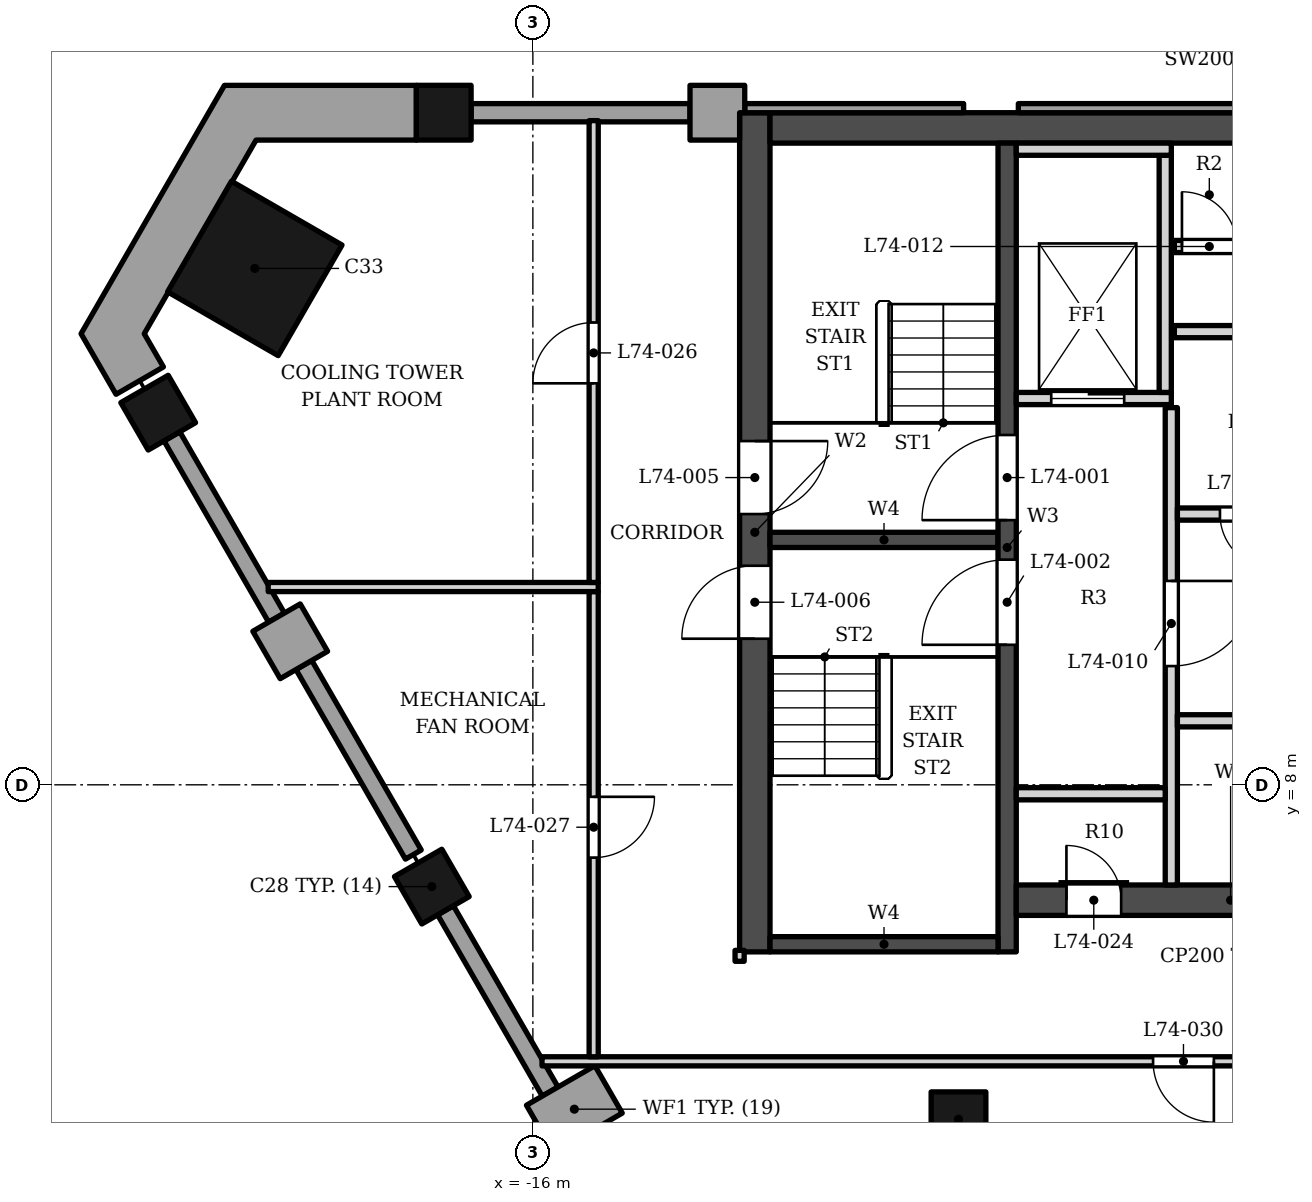
"""IFC4 building model, lengths in metres.
Left out: names, types, materials, properties, quantities, classifications, styles, units other than length and angle.
Written with IfcOpenShell. Run it as: python <this file> out.ifc"""

import sys

from ifc_helpers import new_model, si_unit, direction, frame, frame_2d, origin, origin_2d, place, context, subcontext, project, spatial, polyline, rectangle, outline, extrude, element, fill, save


model = new_model("IFC4")
c1 = context("Model", 3, precision=1e-05, world=origin(), true_north=direction((0.0, 1.0)))
c2 = subcontext(c1, "Body", "Model", "MODEL_VIEW")
j1 = project(units=[si_unit("LENGTHUNIT", "METRE"), si_unit("PLANEANGLEUNIT", "RADIAN")], contexts=[c1])
p1 = place(None, origin())
s1 = spatial("IfcSite", under=j1, at=p1, CompositionType="ELEMENT")
p2 = place(p1, origin())
s2 = spatial("IfcBuilding", under=s1, at=p2, CompositionType="ELEMENT")
p3 = place(p2, frame((0.0, 0.0, 315.5)))
s3 = spatial("IfcBuildingStorey", under=s2, at=p3, CompositionType="ELEMENT", Elevation=315.5)
p4 = place(p3, frame((-12.1, 18.802, 0.0), z_axis=(0.0, 0.0, 1.0), x_axis=(1.0, 0.0, 0.0)))
e1 = element("IfcWall", 1, at=p4, inside=s3, PredefinedType="SHEAR", context=c2, shape_type="SweptSolid", body=[
    extrude(rectangle(XDim=24.2, YDim=0.5, at=frame_2d((12.1, 0.0))), origin(), (0.0, 0.0, 1.0), 5.0),
])
p5 = place(p3, frame((-12.35, 5.253, 0.0), z_axis=(0.0, 0.0, 1.0), x_axis=(0.0, 1.0, 0.0)))
e2 = element("IfcWall", 2, at=p5, inside=s3, PredefinedType="SHEAR", context=c2, shape_type="SweptSolid", body=[
    extrude(rectangle(XDim=13.8, YDim=0.5, at=frame_2d((6.9, 0.0))), origin(), (0.0, 0.0, 1.0), 5.0),
])
p6 = place(p5, frame((7.2, 0.0, 0.0)))
e3 = element("IfcOpeningElement", 3, at=p6, cuts=e2, PredefinedType="OPENING", context=c2, shape_type="SweptSolid", body=[
    extrude(rectangle(XDim=1.2, YDim=2.1, at=frame_2d((0.6, 1.05))), frame((0.0, 0.26, 0.0), z_axis=(0.0, -1.0, 0.0), x_axis=(1.0, 0.0, 0.0)), (0.0, 0.0, 1.0), 0.52),
])
p7 = place(p5, frame((5.15, 0.0, 0.0)))
e4 = element("IfcOpeningElement", 4, at=p7, cuts=e2, PredefinedType="OPENING", context=c2, shape_type="SweptSolid", body=[
    extrude(rectangle(XDim=1.2, YDim=2.1, at=frame_2d((0.6, 1.05))), frame((0.0, 0.26, 0.0), z_axis=(0.0, -1.0, 0.0), x_axis=(1.0, 0.0, 0.0)), (0.0, 0.0, 1.0), 0.52),
])
p8 = place(p3, frame((-8.2, 5.253, 0.0), z_axis=(0.0, 0.0, 1.0), x_axis=(0.0, 1.0, 0.0)))
e5 = element("IfcWall", 5, at=p8, inside=s3, PredefinedType="SHEAR", context=c2, shape_type="SweptSolid", body=[
    extrude(rectangle(XDim=13.3, YDim=0.3, at=frame_2d((6.65, 0.0))), origin(), (0.0, 0.0, 1.0), 5.0),
])
p9 = place(p8, frame((7.1, 0.0, 0.0)))
e6 = element("IfcOpeningElement", 6, at=p9, cuts=e5, PredefinedType="OPENING", context=c2, shape_type="SweptSolid", body=[
    extrude(rectangle(XDim=1.4, YDim=2.1, at=frame_2d((0.7, 1.05))), frame((0.0, 0.16, 0.0), z_axis=(0.0, -1.0, 0.0), x_axis=(1.0, 0.0, 0.0)), (0.0, 0.0, 1.0), 0.32),
])
p10 = place(p8, frame((5.05, 0.0, 0.0)))
e7 = element("IfcOpeningElement", 7, at=p10, cuts=e5, PredefinedType="OPENING", context=c2, shape_type="SweptSolid", body=[
    extrude(rectangle(XDim=1.4, YDim=2.1, at=frame_2d((0.7, 1.05))), frame((0.0, 0.16, 0.0), z_axis=(0.0, -1.0, 0.0), x_axis=(1.0, 0.0, 0.0)), (0.0, 0.0, 1.0), 0.32),
])
for number, where, z_axis, x_axis in (
    (8, (-12.1, 12.028, 0.0), (0.0, 0.0, 1.0), (1.0, 0.0, 0.0)),
    (9, (-12.1, 5.378, 0.0), (0.0, 0.0, 1.0), (1.0, 0.0, 0.0)),
):
    element("IfcWall", number, at=place(p3, frame(where, z_axis=z_axis, x_axis=x_axis)), inside=s3, PredefinedType="SHEAR", context=c2, shape_type="SweptSolid", body=[
        extrude(rectangle(XDim=3.75, YDim=0.25, at=frame_2d((1.875, 0.0))), origin(), (0.0, 0.0, 1.0), 5.0),
    ])
p11 = place(p3, frame((-8.05, 6.103, 0.0), z_axis=(0.0, 0.0, 1.0), x_axis=(1.0, 0.0, 0.0)))
e10 = element("IfcWall", 10, at=p11, inside=s3, PredefinedType="SHEAR", context=c2, shape_type="SweptSolid", body=[
    extrude(rectangle(XDim=7.05, YDim=0.5, at=frame_2d((3.525, 0.0))), origin(), (0.0, 0.0, 1.0), 5.0),
])
p12 = place(p11, frame((0.825, 0.0, 0.0)))
e11 = element("IfcOpeningElement", 11, at=p12, cuts=e10, PredefinedType="OPENING", context=c2, shape_type="SweptSolid", body=[
    extrude(rectangle(XDim=0.9, YDim=2.1, at=frame_2d((0.45, 1.05))), frame((0.0, 0.26, 0.0), z_axis=(0.0, -1.0, 0.0), x_axis=(1.0, 0.0, 0.0)), (0.0, 0.0, 1.0), 0.52),
])
p13 = place(p3, frame((-20.573, 16.492, 0.0), z_axis=(0.0, 0.0, 1.0), x_axis=(0.866025395058, -0.500000015115, 0.0)))
e12 = element("IfcColumn", 12, at=p13, inside=s3, PredefinedType="COLUMN", context=c2, shape_type="SweptSolid", body=[
    extrude(rectangle(XDim=2.1, YDim=2.1, at=origin_2d()), origin(), (0.0, 0.0, 1.0), 5.0),
])
for number, where, z_axis, x_axis in (
    (13, (-9.0, 2.5, 0.0), (0.0, 0.0, 1.0), (1.0, 0.0, 0.0)),
    (14, (-22.162, 14.12, 0.0), (0.0, 0.0, 1.0), (0.5, -0.866, 0.0)),
    (15, (-17.662, 6.326, 0.0), (0.0, 0.0, 1.0), (0.5, -0.866, 0.0)),
    (16, (-17.466, 19.053, 0.0), (0.0, 0.0, 1.0), (-1.0, 0.0, 0.0)),
):
    element("IfcColumn", number, at=place(p3, frame(where, z_axis=z_axis, x_axis=x_axis)), inside=s3, PredefinedType="COLUMN", context=c2, shape_type="SweptSolid", body=[
        extrude(rectangle(XDim=0.9, YDim=0.9, at=origin_2d()), origin(), (0.0, 0.0, 1.0), 5.0),
    ])
p14 = place(p3, frame((-20.216, 10.75, 0.0), z_axis=(0.0, 0.0, 1.0), x_axis=(0.500105887137, -0.865964261186, 0.0)))
e17 = element("IfcWall", 17, at=p14, inside=s3, PredefinedType="SOLIDWALL", context=c2, shape_type="SweptSolid", body=[
    extrude(rectangle(XDim=0.9, YDim=0.9, at=frame_2d((0.45, 0.0))), origin(), (0.0, 0.0, 1.0), 3.8),
])
p15 = place(p3, frame((-15.881, 2.341, 0.0), z_axis=(0.0, 0.0, 1.0), x_axis=(0.86611990832, 0.499836277606, 0.0)))
e18 = element("IfcWall", 18, at=p15, inside=s3, PredefinedType="SOLIDWALL", context=c2, shape_type="SweptSolid", body=[
    extrude(rectangle(XDim=1.3, YDim=0.9, at=frame_2d((0.65, 0.0))), origin(), (0.0, 0.0, 1.0), 3.8),
])
p16 = place(p3, origin())
e19 = element("IfcWall", 19, at=p16, inside=s3, PredefinedType="ELEMENTEDWALL", context=c2, shape_type="SweptSolid", body=[
    extrude(outline(polyline([(-20.086, 10.825), (-21.807, 13.805), (-22.067, 13.655), (-20.346, 10.675), (-20.086, 10.825)])), origin(), (0.0, 0.0, 1.0), 3.8),
])
p17 = place(p3, frame((-19.766, 9.97, 0.0), z_axis=(0.0, 0.0, 1.0), x_axis=(0.499961193289, -0.866047807691, 0.0)))
e20 = element("IfcWall", 20, at=p17, inside=s3, PredefinedType="ELEMENTEDWALL", context=c2, shape_type="SweptSolid", body=[
    extrude(rectangle(XDim=3.6, YDim=0.3, at=frame_2d((1.8, 0.0))), origin(), (0.0, 0.0, 1.0), 3.8),
])
p18 = place(p3, origin())
e21 = element("IfcWall", 21, at=p18, inside=s3, PredefinedType="ELEMENTEDWALL", context=c2, shape_type="SweptSolid", body=[
    extrude(outline(polyline([(-15.586, 3.031), (-17.307, 6.011), (-17.567, 5.861), (-15.846, 2.88), (-15.586, 3.031)])), origin(), (0.0, 0.0, 1.0), 3.8),
])
p19 = place(p3, origin())
e22 = element("IfcWall", 22, at=p19, inside=s3, PredefinedType="SOLIDWALL", context=c2, shape_type="SweptSolid", body=[
    extrude(outline(polyline([(-13.416, 19.502), (-13.416, 18.603), (-12.6, 18.603), (-12.6, 19.052), (-12.516, 19.052), (-12.516, 19.502), (-13.416, 19.502)])), origin(), (0.0, 0.0, 1.0), 3.8),
])
p20 = place(p3, origin())
e23 = element("IfcWall", 23, at=p20, inside=s3, PredefinedType="ELEMENTEDWALL", context=c2, shape_type="SweptSolid", body=[
    extrude(outline(polyline([(-4.416, 19.203), (-8.016, 19.203), (-8.016, 19.052), (-4.416, 19.052), (-4.416, 19.203)])), origin(), (0.0, 0.0, 1.0), 3.8),
])
p21 = place(p3, origin())
e24 = element("IfcWall", 24, at=p21, inside=s3, PredefinedType="ELEMENTEDWALL", context=c2, shape_type="SweptSolid", body=[
    extrude(outline(polyline([(-8.916, 19.203), (-12.516, 19.203), (-12.516, 19.052), (-8.916, 19.052), (-8.916, 19.203)])), origin(), (0.0, 0.0, 1.0), 3.8),
])
p22 = place(p3, frame((-13.416, 19.052, 0.0), z_axis=(0.0, 0.0, 1.0), x_axis=(-1.0, 0.0, 0.0)))
e25 = element("IfcWall", 25, at=p22, inside=s3, PredefinedType="ELEMENTEDWALL", context=c2, shape_type="SweptSolid", body=[
    extrude(rectangle(XDim=3.6, YDim=0.3, at=frame_2d((1.8, 0.0))), origin(), (0.0, 0.0, 1.0), 3.8),
])
p23 = place(p3, origin())
e26 = element("IfcWall", 26, at=p23, inside=s3, PredefinedType="SOLIDWALL", context=c2, shape_type="SweptSolid", body=[
    extrude(outline(polyline([(-17.916, 18.603), (-17.916, 19.502), (-21.073, 19.502), (-23.431, 15.418), (-22.856, 14.422), (-22.076, 14.872), (-22.392, 15.418), (-20.553, 18.603), (-17.916, 18.603)])), origin(), (0.0, 0.0, 1.0), 3.8),
])
p24 = place(p3, frame((-5.5, 6.353, 0.0), z_axis=(0.0, 0.0, 1.0), x_axis=(0.0, 1.0, 0.0)))
e27 = element("IfcWall", 27, at=p24, inside=s3, PredefinedType="SOLIDWALL", context=c2, shape_type="SweptSolid", body=[
    extrude(rectangle(XDim=7.85, YDim=0.2, at=frame_2d((3.925, 0.0))), origin(), (0.0, 0.0, 1.0), 4.8),
])
p25 = place(p24, frame((3.6, 0.0, 0.0)))
e28 = element("IfcOpeningElement", 28, at=p25, cuts=e27, PredefinedType="OPENING", context=c2, shape_type="SweptSolid", body=[
    extrude(rectangle(XDim=1.4, YDim=2.1, at=frame_2d((0.7, 1.05))), frame((0.0, 0.11, 0.0), z_axis=(0.0, -1.0, 0.0), x_axis=(1.0, 0.0, 0.0)), (0.0, 0.0, 1.0), 0.22),
])
p26 = place(p3, frame((-8.05, 7.853, 0.0), z_axis=(0.0, 0.0, 1.0), x_axis=(1.0, 0.0, 0.0)))
e29 = element("IfcWall", 29, at=p26, inside=s3, PredefinedType="SOLIDWALL", context=c2, shape_type="SweptSolid", body=[
    extrude(rectangle(XDim=2.45, YDim=0.2, at=frame_2d((1.225, 0.0))), origin(), (0.0, 0.0, 1.0), 4.8),
])
p27 = place(p3, frame((-5.4, 9.052, 0.0), z_axis=(0.0, 0.0, 1.0), x_axis=(1.0, 0.0, 0.0)))
e30 = element("IfcWall", 30, at=p27, inside=s3, PredefinedType="PARTITIONING", context=c2, shape_type="SweptSolid", body=[
    extrude(rectangle(XDim=4.3, YDim=0.2, at=frame_2d((2.15, 0.0))), origin(), (0.0, 0.0, 1.0), 4.8),
])
p28 = place(p27, frame((1.7, 0.0, 0.0)))
e31 = element("IfcOpeningElement", 31, at=p28, cuts=e30, PredefinedType="OPENING", context=c2, shape_type="SweptSolid", body=[
    extrude(rectangle(XDim=0.9, YDim=2.1, at=frame_2d((0.45, 1.05))), frame((0.0, 0.11, 0.0), z_axis=(0.0, -1.0, 0.0), x_axis=(1.0, 0.0, 0.0)), (0.0, 0.0, 1.0), 0.22),
])
p29 = place(p3, frame((-5.4, 12.453, 0.0), z_axis=(0.0, 0.0, 1.0), x_axis=(1.0, 0.0, 0.0)))
e32 = element("IfcWall", 32, at=p29, inside=s3, PredefinedType="PARTITIONING", context=c2, shape_type="SweptSolid", body=[
    extrude(rectangle(XDim=2.3, YDim=0.2, at=frame_2d((1.15, 0.0))), origin(), (0.0, 0.0, 1.0), 4.8),
])
p30 = place(p29, frame((0.7, 0.0, 0.0)))
e33 = element("IfcOpeningElement", 33, at=p30, cuts=e32, PredefinedType="OPENING", context=c2, shape_type="SweptSolid", body=[
    extrude(rectangle(XDim=0.9, YDim=2.1, at=frame_2d((0.45, 1.05))), frame((0.0, 0.11, 0.0), z_axis=(0.0, -1.0, 0.0), x_axis=(1.0, 0.0, 0.0)), (0.0, 0.0, 1.0), 0.22),
])
p31 = place(p3, frame((-8.05, 14.353, 0.0), z_axis=(0.0, 0.0, 1.0), x_axis=(1.0, 0.0, 0.0)))
e34 = element("IfcWall", 34, at=p31, inside=s3, PredefinedType="SOLIDWALL", context=c2, shape_type="SweptSolid", body=[
    extrude(rectangle(XDim=2.55, YDim=0.2, at=frame_2d((1.275, 0.0))), origin(), (0.0, 0.0, 1.0), 4.8),
])
p32 = place(p31, frame((0.575, 0.0, 0.0)))
e35 = element("IfcOpeningElement", 35, at=p32, cuts=e34, PredefinedType="OPENING", context=c2, shape_type="SweptSolid", body=[
    extrude(rectangle(XDim=1.2, YDim=2.1, at=frame_2d((0.6, 1.05))), frame((0.0, 0.11, 0.0), z_axis=(0.0, -1.0, 0.0), x_axis=(1.0, 0.0, 0.0)), (0.0, 0.0, 1.0), 0.22),
])
p33 = place(p3, frame((-5.6, 14.453, 0.0), z_axis=(0.0, 0.0, 1.0), x_axis=(0.0, 1.0, 0.0)))
e36 = element("IfcWall", 36, at=p33, inside=s3, PredefinedType="SOLIDWALL", context=c2, shape_type="SweptSolid", body=[
    extrude(rectangle(XDim=3.9, YDim=0.2, at=frame_2d((1.95, 0.0))), origin(), (0.0, 0.0, 1.0), 4.8),
])
p34 = place(p3, frame((-5.45, 15.453, 0.0), z_axis=(0.0, 0.0, 1.0), x_axis=(1.0, 0.0, 0.0)))
e37 = element("IfcWall", 37, at=p34, inside=s3, PredefinedType="SOLIDWALL", context=c2, shape_type="SweptSolid", body=[
    extrude(rectangle(XDim=2.35, YDim=0.2, at=frame_2d((1.175, 0.0))), origin(), (0.0, 0.0, 1.0), 4.8),
])
p35 = place(p3, frame((-5.45, 16.853, 0.0), z_axis=(0.0, 0.0, 1.0), x_axis=(1.0, 0.0, 0.0)))
e38 = element("IfcWall", 38, at=p35, inside=s3, PredefinedType="SOLIDWALL", context=c2, shape_type="SweptSolid", body=[
    extrude(rectangle(XDim=2.55, YDim=0.2, at=frame_2d((1.275, 0.0))), origin(), (0.0, 0.0, 1.0), 4.8),
])
p36 = place(p35, frame((0.125, 0.0, 0.0)))
e39 = element("IfcOpeningElement", 39, at=p36, cuts=e38, PredefinedType="OPENING", context=c2, shape_type="SweptSolid", body=[
    extrude(rectangle(XDim=0.9, YDim=2.1, at=frame_2d((0.45, 1.05))), frame((0.0, 0.11, 0.0), z_axis=(0.0, -1.0, 0.0), x_axis=(1.0, 0.0, 0.0)), (0.0, 0.0, 1.0), 0.22),
])
p37 = place(p35, frame((1.375, 0.0, 0.0)))
e40 = element("IfcOpeningElement", 40, at=p37, cuts=e38, PredefinedType="OPENING", context=c2, shape_type="SweptSolid", body=[
    extrude(rectangle(XDim=0.9, YDim=2.1, at=frame_2d((0.45, 1.05))), frame((0.0, 0.11, 0.0), z_axis=(0.0, -1.0, 0.0), x_axis=(1.0, 0.0, 0.0)), (0.0, 0.0, 1.0), 0.22),
])
p38 = place(p3, frame((-8.05, 18.453, 0.0), z_axis=(0.0, 0.0, 1.0), x_axis=(1.0, 0.0, 0.0)))
e41 = element("IfcWall", 41, at=p38, inside=s3, PredefinedType="SOLIDWALL", context=c2, shape_type="SweptSolid", body=[
    extrude(rectangle(XDim=2.55, YDim=0.2, at=frame_2d((1.275, 0.0))), origin(), (0.0, 0.0, 1.0), 4.8),
])
p39 = place(p3, frame((-15.85, 3.453, 0.0), z_axis=(0.0, 0.0, 1.0), x_axis=(1.0, 0.0, 0.0)))
e42 = element("IfcWall", 42, at=p39, inside=s3, PredefinedType="PARTITIONING", context=c2, shape_type="SweptSolid", body=[
    extrude(rectangle(XDim=17.755, YDim=0.15, at=frame_2d((8.877, 0.0))), origin(), (0.0, 0.0, 1.0), 4.1),
])
p40 = place(p39, frame((10.05, 0.0, 0.0)))
e43 = element("IfcOpeningElement", 43, at=p40, cuts=e42, PredefinedType="OPENING", context=c2, shape_type="SweptSolid", body=[
    extrude(rectangle(XDim=1.0, YDim=2.1, at=frame_2d((0.5, 1.05))), frame((0.0, 0.085, 0.0), z_axis=(0.0, -1.0, 0.0), x_axis=(1.0, 0.0, 0.0)), (0.0, 0.0, 1.0), 0.17),
])
p41 = place(p3, frame((-15.0, 3.528, 0.0), z_axis=(0.0, 0.0, 1.0), x_axis=(0.0, 1.0, 0.0)))
e44 = element("IfcWall", 44, at=p41, inside=s3, PredefinedType="PARTITIONING", context=c2, shape_type="SweptSolid", body=[
    extrude(rectangle(XDim=7.65, YDim=0.15, at=frame_2d((3.825, 0.0))), origin(), (0.0, 0.0, 1.0), 4.02),
])
p42 = place(p41, frame((3.275, 0.0, 0.0)))
e45 = element("IfcOpeningElement", 45, at=p42, cuts=e44, PredefinedType="OPENING", context=c2, shape_type="SweptSolid", body=[
    extrude(rectangle(XDim=1.0, YDim=2.1, at=frame_2d((0.5, 1.05))), frame((0.0, 0.085, 0.0), z_axis=(0.0, -1.0, 0.0), x_axis=(1.0, 0.0, 0.0)), (0.0, 0.0, 1.0), 0.17),
])
p43 = place(p3, frame((-12.6, 5.098, 0.0), z_axis=(0.0, 0.0, 1.0), x_axis=(0.0, 1.0, 0.0)))
e46 = element("IfcWall", 46, at=p43, inside=s3, PredefinedType="PARTITIONING", context=c2, shape_type="SweptSolid", body=[
    extrude(rectangle(XDim=0.18, YDim=0.15, at=frame_2d((0.09, 0.0))), origin(), (0.0, 0.0, 1.0), 4.8),
])
p44 = place(p3, frame((-20.353, 11.253, 0.0), z_axis=(0.0, 0.0, 1.0), x_axis=(1.0, 0.0, 0.0)))
e47 = element("IfcWall", 47, at=p44, inside=s3, PredefinedType="PARTITIONING", context=c2, shape_type="SweptSolid", body=[
    extrude(rectangle(XDim=5.428, YDim=0.15, at=frame_2d((2.714, 0.0))), origin(), (0.0, 0.0, 1.0), 4.1),
])
p45 = place(p3, frame((-15.0, 11.328, 0.0), z_axis=(0.0, 0.0, 1.0), x_axis=(0.0, 1.0, 0.0)))
e48 = element("IfcWall", 48, at=p45, inside=s3, PredefinedType="PARTITIONING", context=c2, shape_type="SweptSolid", body=[
    extrude(rectangle(XDim=7.595, YDim=0.15, at=frame_2d((3.797, 0.0))), origin(), (0.0, 0.0, 1.0), 4.8),
])
p46 = place(p45, frame((3.275, 0.0, 0.0)))
e49 = element("IfcOpeningElement", 49, at=p46, cuts=e48, PredefinedType="OPENING", context=c2, shape_type="SweptSolid", body=[
    extrude(rectangle(XDim=1.0, YDim=2.1, at=frame_2d((0.5, 1.05))), frame((0.0, 0.085, 0.0), z_axis=(0.0, -1.0, 0.0), x_axis=(1.0, 0.0, 0.0)), (0.0, 0.0, 1.0), 0.17),
])
p47 = place(p32, origin())
e50 = element("IfcDoor", 50, at=p47, inside=s3, OperationType="DOUBLE_DOOR_SLIDING", PredefinedType="DOOR", context=c2, shape_type="SweptSolid", body=[
    extrude(rectangle(XDim=1.2, YDim=2.1, at=frame_2d((0.6, 1.05))), frame((0.0, 0.025, 0.0), z_axis=(0.0, -1.0, 0.0), x_axis=(1.0, 0.0, 0.0)), (0.0, 0.0, 1.0), 0.05),
])
fill(e35, e50)
p48 = place(p9, origin())
e51 = element("IfcDoor", 51, at=p48, inside=s3, OperationType="SINGLE_SWING_LEFT", PredefinedType="DOOR", context=c2, shape_type="SweptSolid", body=[
    extrude(rectangle(XDim=1.4, YDim=2.1, at=frame_2d((0.7, 1.05))), frame((0.0, 0.025, 0.0), z_axis=(0.0, -1.0, 0.0), x_axis=(1.0, 0.0, 0.0)), (0.0, 0.0, 1.0), 0.05),
])
fill(e6, e51)
p49 = place(p10, origin())
e52 = element("IfcDoor", 52, at=p49, inside=s3, OperationType="SINGLE_SWING_LEFT", PredefinedType="DOOR", context=c2, shape_type="SweptSolid", body=[
    extrude(rectangle(XDim=1.4, YDim=2.1, at=frame_2d((0.7, 1.05))), frame((0.0, 0.025, 0.0), z_axis=(0.0, -1.0, 0.0), x_axis=(1.0, 0.0, 0.0)), (0.0, 0.0, 1.0), 0.05),
])
fill(e7, e52)
p50 = place(p6, origin())
e53 = element("IfcDoor", 53, at=p50, inside=s3, OperationType="SINGLE_SWING_RIGHT", PredefinedType="DOOR", context=c2, shape_type="SweptSolid", body=[
    extrude(rectangle(XDim=1.2, YDim=2.1, at=frame_2d((0.6, 1.05))), frame((0.0, 0.025, 0.0), z_axis=(0.0, -1.0, 0.0), x_axis=(1.0, 0.0, 0.0)), (0.0, 0.0, 1.0), 0.05),
])
fill(e3, e53)
p51 = place(p7, origin())
e54 = element("IfcDoor", 54, at=p51, inside=s3, OperationType="SINGLE_SWING_LEFT", PredefinedType="DOOR", context=c2, shape_type="SweptSolid", body=[
    extrude(rectangle(XDim=1.2, YDim=2.1, at=frame_2d((0.6, 1.05))), frame((0.0, 0.025, 0.0), z_axis=(0.0, -1.0, 0.0), x_axis=(1.0, 0.0, 0.0)), (0.0, 0.0, 1.0), 0.05),
])
fill(e4, e54)
p52 = place(p25, origin())
e55 = element("IfcDoor", 55, at=p52, inside=s3, OperationType="SINGLE_SWING_RIGHT", PredefinedType="DOOR", context=c2, shape_type="SweptSolid", body=[
    extrude(rectangle(XDim=1.4, YDim=2.1, at=frame_2d((0.7, 1.05))), frame((0.0, 0.025, 0.0), z_axis=(0.0, -1.0, 0.0), x_axis=(1.0, 0.0, 0.0)), (0.0, 0.0, 1.0), 0.05),
])
fill(e28, e55)
p53 = place(p36, origin())
e56 = element("IfcDoor", 56, at=p53, inside=s3, OperationType="SINGLE_SWING_LEFT", PredefinedType="DOOR", context=c2, shape_type="SweptSolid", body=[
    extrude(rectangle(XDim=0.9, YDim=2.1, at=frame_2d((0.45, 1.05))), frame((0.0, 0.025, 0.0), z_axis=(0.0, -1.0, 0.0), x_axis=(1.0, 0.0, 0.0)), (0.0, 0.0, 1.0), 0.05),
])
fill(e39, e56)
p54 = place(p30, origin())
e57 = element("IfcDoor", 57, at=p54, inside=s3, OperationType="SINGLE_SWING_RIGHT", PredefinedType="DOOR", context=c2, shape_type="SweptSolid", body=[
    extrude(rectangle(XDim=0.9, YDim=2.1, at=frame_2d((0.45, 1.05))), frame((0.0, 0.025, 0.0), z_axis=(0.0, -1.0, 0.0), x_axis=(1.0, 0.0, 0.0)), (0.0, 0.0, 1.0), 0.05),
])
fill(e33, e57)
p55 = place(p12, origin())
e58 = element("IfcDoor", 58, at=p55, inside=s3, OperationType="SINGLE_SWING_LEFT", PredefinedType="DOOR", context=c2, shape_type="SweptSolid", body=[
    extrude(rectangle(XDim=0.9, YDim=2.1, at=frame_2d((0.45, 1.05))), frame((0.0, 0.025, 0.0), z_axis=(0.0, -1.0, 0.0), x_axis=(1.0, 0.0, 0.0)), (0.0, 0.0, 1.0), 0.05),
])
fill(e11, e58)
p56 = place(p46, origin())
e59 = element("IfcDoor", 59, at=p56, inside=s3, OperationType="SINGLE_SWING_LEFT", PredefinedType="DOOR", context=c2, shape_type="SweptSolid", body=[
    extrude(rectangle(XDim=1.0, YDim=2.1, at=frame_2d((0.5, 1.05))), frame((0.0, 0.025, 0.0), z_axis=(0.0, -1.0, 0.0), x_axis=(1.0, 0.0, 0.0)), (0.0, 0.0, 1.0), 0.05),
])
fill(e49, e59)
p57 = place(p42, origin())
e60 = element("IfcDoor", 60, at=p57, inside=s3, OperationType="SINGLE_SWING_RIGHT", PredefinedType="DOOR", context=c2, shape_type="SweptSolid", body=[
    extrude(rectangle(XDim=1.0, YDim=2.1, at=frame_2d((0.5, 1.05))), frame((0.0, 0.025, 0.0), z_axis=(0.0, -1.0, 0.0), x_axis=(1.0, 0.0, 0.0)), (0.0, 0.0, 1.0), 0.05),
])
fill(e45, e60)
p58 = place(p40, origin())
e61 = element("IfcDoor", 61, at=p58, inside=s3, OperationType="SINGLE_SWING_RIGHT", PredefinedType="DOOR", context=c2, shape_type="SweptSolid", body=[
    extrude(rectangle(XDim=1.0, YDim=2.1, at=frame_2d((0.5, 1.05))), frame((0.0, 0.025, 0.0), z_axis=(0.0, -1.0, 0.0), x_axis=(1.0, 0.0, 0.0)), (0.0, 0.0, 1.0), 0.05),
])
fill(e43, e61)
save(model, sys.argv[1])
